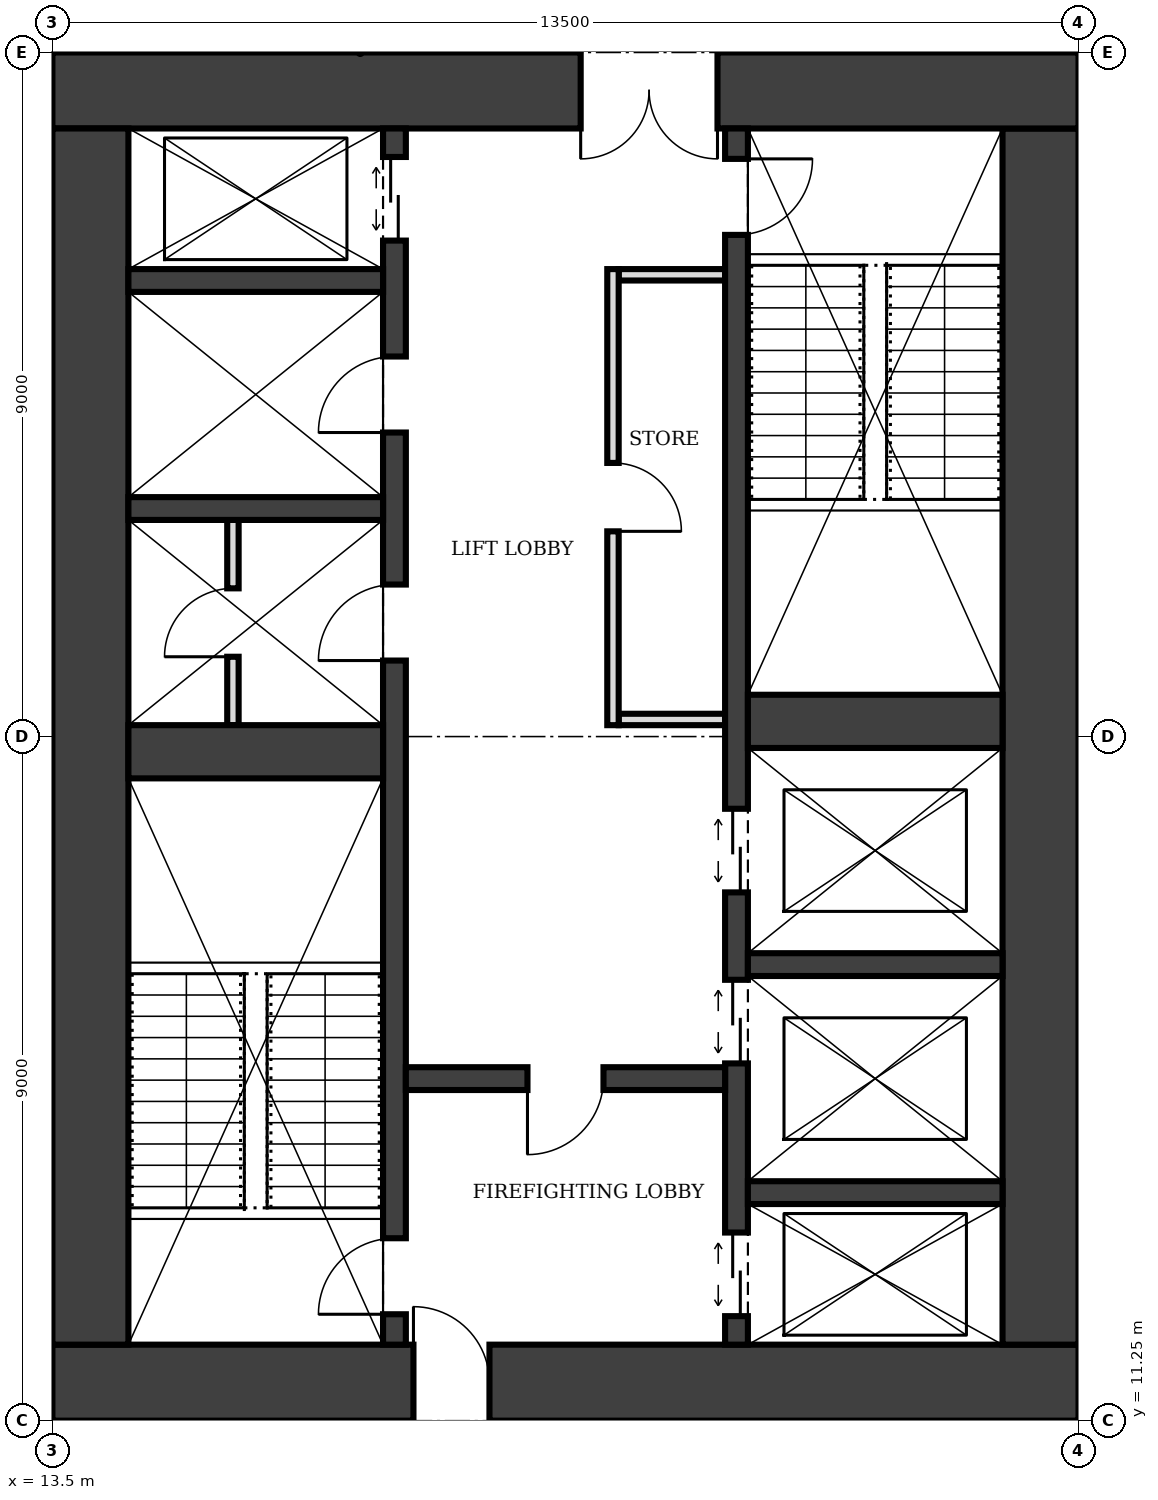
"""IFC4 building model, lengths in metres.
Left out: names, types, materials, properties, quantities, classifications, styles, units other than length and angle.
Written with IfcOpenShell. Run it as: python <this file> out.ifc"""

import sys

from ifc_helpers import new_model, si_unit, direction, frame, frame_2d, origin, place, context, subcontext, project, spatial, rectangle, extrude, element, fill, save


model = new_model("IFC4")
c1 = context("Model", 3, precision=1e-05, world=origin(), true_north=direction((0.0, 1.0)))
c2 = subcontext(c1, "Body", "Model", "MODEL_VIEW")
j1 = project(units=[si_unit("LENGTHUNIT", "METRE"), si_unit("PLANEANGLEUNIT", "RADIAN")], contexts=[c1])
p1 = place(None, origin())
s1 = spatial("IfcSite", under=j1, at=p1, CompositionType="ELEMENT")
p2 = place(p1, origin())
s2 = spatial("IfcBuilding", under=s1, at=p2, CompositionType="ELEMENT")
p3 = place(p2, frame((0.0, 0.0, 253.0)))
s3 = spatial("IfcBuildingStorey", under=s2, at=p3, CompositionType="ELEMENT", Elevation=253.0)
p4 = place(p3, frame((13.5, 11.75, 0.0), z_axis=(0.0, 0.0, 1.0), x_axis=(1.0, 0.0, 0.0)))
e1 = element("IfcWall", 1, at=p4, inside=s3, PredefinedType="SHEAR", context=c2, shape_type="SweptSolid", body=[
    extrude(rectangle(XDim=13.5, YDim=1.0, at=frame_2d((6.75, 0.0))), origin(), (0.0, 0.0, 1.0), 4.0),
])
p5 = place(p4, frame((4.75, 0.0, 0.0)))
e2 = element("IfcOpeningElement", 2, at=p5, cuts=e1, PredefinedType="OPENING", context=c2, shape_type="SweptSolid", body=[
    extrude(rectangle(XDim=1.0, YDim=2.1, at=frame_2d((0.5, 1.05))), frame((0.0, 0.51, 0.0), z_axis=(0.0, -1.0, 0.0), x_axis=(1.0, 0.0, 0.0)), (0.0, 0.0, 1.0), 1.02),
])
p6 = place(p3, frame((26.5, 12.25, 0.0), z_axis=(0.0, 0.0, 1.0), x_axis=(0.0, 1.0, 0.0)))
e3 = element("IfcWall", 3, at=p6, inside=s3, PredefinedType="SHEAR", context=c2, shape_type="SweptSolid", body=[
    extrude(rectangle(XDim=16.0, YDim=1.0, at=frame_2d((8.0, 0.0))), origin(), (0.0, 0.0, 1.0), 4.0),
])
p7 = place(p3, frame((27.0, 28.75, 0.0), z_axis=(0.0, 0.0, 1.0), x_axis=(-1.0, 0.0, 0.0)))
e4 = element("IfcWall", 4, at=p7, inside=s3, PredefinedType="SHEAR", context=c2, shape_type="SweptSolid", body=[
    extrude(rectangle(XDim=13.5, YDim=1.0, at=frame_2d((6.75, 0.0))), origin(), (0.0, 0.0, 1.0), 4.0),
])
p8 = place(p7, frame((4.75, 0.0, 0.0)))
e5 = element("IfcOpeningElement", 5, at=p8, cuts=e4, PredefinedType="OPENING", context=c2, shape_type="SweptSolid", body=[
    extrude(rectangle(XDim=1.8, YDim=2.1, at=frame_2d((0.9, 1.05))), frame((0.0, 0.51, 0.0), z_axis=(0.0, -1.0, 0.0), x_axis=(1.0, 0.0, 0.0)), (0.0, 0.0, 1.0), 1.02),
])
p9 = place(p3, frame((14.0, 28.25, 0.0), z_axis=(0.0, 0.0, 1.0), x_axis=(0.0, -1.0, 0.0)))
e6 = element("IfcWall", 6, at=p9, inside=s3, PredefinedType="SHEAR", context=c2, shape_type="SweptSolid", body=[
    extrude(rectangle(XDim=16.0, YDim=1.0, at=frame_2d((8.0, 0.0))), origin(), (0.0, 0.0, 1.0), 4.0),
])
p10 = place(p3, frame((18.0, 12.25, 0.0), z_axis=(0.0, 0.0, 1.0), x_axis=(0.0, 1.0, 0.0)))
e7 = element("IfcWall", 7, at=p10, inside=s3, PredefinedType="SHEAR", context=c2, shape_type="SweptSolid", body=[
    extrude(rectangle(XDim=16.0, YDim=0.3, at=frame_2d((8.0, 0.0))), origin(), (0.0, 0.0, 1.0), 4.0),
])
p11 = place(p10, frame((0.4, 0.0, 0.0)))
e8 = element("IfcOpeningElement", 8, at=p11, cuts=e7, PredefinedType="OPENING", context=c2, shape_type="SweptSolid", body=[
    extrude(rectangle(XDim=1.0, YDim=2.1, at=frame_2d((0.5, 1.05))), frame((0.0, 0.16, 0.0), z_axis=(0.0, -1.0, 0.0), x_axis=(1.0, 0.0, 0.0)), (0.0, 0.0, 1.0), 0.32),
])
p12 = place(p10, frame((14.525, 0.0, 0.0)))
e9 = element("IfcOpeningElement", 9, at=p12, cuts=e7, PredefinedType="OPENING", context=c2, shape_type="SweptSolid", body=[
    extrude(rectangle(XDim=1.1, YDim=2.1, at=frame_2d((0.55, 1.05))), frame((0.0, 0.16, 0.0), z_axis=(0.0, -1.0, 0.0), x_axis=(1.0, 0.0, 0.0)), (0.0, 0.0, 1.0), 0.32),
])
p13 = place(p10, frame((9.0, 0.0, 0.0)))
e10 = element("IfcOpeningElement", 10, at=p13, cuts=e7, PredefinedType="OPENING", context=c2, shape_type="SweptSolid", body=[
    extrude(rectangle(XDim=1.0, YDim=2.1, at=frame_2d((0.5, 1.05))), frame((0.0, 0.16, 0.0), z_axis=(0.0, -1.0, 0.0), x_axis=(1.0, 0.0, 0.0)), (0.0, 0.0, 1.0), 0.32),
])
p14 = place(p10, frame((12.0, 0.0, 0.0)))
e11 = element("IfcOpeningElement", 11, at=p14, cuts=e7, PredefinedType="OPENING", context=c2, shape_type="SweptSolid", body=[
    extrude(rectangle(XDim=1.0, YDim=2.1, at=frame_2d((0.5, 1.05))), frame((0.0, 0.16, 0.0), z_axis=(0.0, -1.0, 0.0), x_axis=(1.0, 0.0, 0.0)), (0.0, 0.0, 1.0), 0.32),
])
p15 = place(p3, frame((22.5, 12.25, 0.0), z_axis=(0.0, 0.0, 1.0), x_axis=(0.0, 1.0, 0.0)))
e12 = element("IfcWall", 12, at=p15, inside=s3, PredefinedType="SHEAR", context=c2, shape_type="SweptSolid", body=[
    extrude(rectangle(XDim=16.0, YDim=0.3, at=frame_2d((8.0, 0.0))), origin(), (0.0, 0.0, 1.0), 4.0),
])
p16 = place(p15, frame((14.6, 0.0, 0.0)))
e13 = element("IfcOpeningElement", 13, at=p16, cuts=e12, PredefinedType="OPENING", context=c2, shape_type="SweptSolid", body=[
    extrude(rectangle(XDim=1.0, YDim=2.1, at=frame_2d((0.5, 1.05))), frame((0.0, 0.16, 0.0), z_axis=(0.0, -1.0, 0.0), x_axis=(1.0, 0.0, 0.0)), (0.0, 0.0, 1.0), 0.32),
])
p17 = place(p15, frame((0.375, 0.0, 0.0)))
e14 = element("IfcOpeningElement", 14, at=p17, cuts=e12, PredefinedType="OPENING", context=c2, shape_type="SweptSolid", body=[
    extrude(rectangle(XDim=1.1, YDim=2.1, at=frame_2d((0.55, 1.05))), frame((0.0, 0.16, 0.0), z_axis=(0.0, -1.0, 0.0), x_axis=(1.0, 0.0, 0.0)), (0.0, 0.0, 1.0), 0.32),
])
p18 = place(p15, frame((3.7, 0.0, 0.0)))
e15 = element("IfcOpeningElement", 15, at=p18, cuts=e12, PredefinedType="OPENING", context=c2, shape_type="SweptSolid", body=[
    extrude(rectangle(XDim=1.1, YDim=2.1, at=frame_2d((0.55, 1.05))), frame((0.0, 0.16, 0.0), z_axis=(0.0, -1.0, 0.0), x_axis=(1.0, 0.0, 0.0)), (0.0, 0.0, 1.0), 0.32),
])
p19 = place(p15, frame((5.95, 0.0, 0.0)))
e16 = element("IfcOpeningElement", 16, at=p19, cuts=e12, PredefinedType="OPENING", context=c2, shape_type="SweptSolid", body=[
    extrude(rectangle(XDim=1.1, YDim=2.1, at=frame_2d((0.55, 1.05))), frame((0.0, 0.16, 0.0), z_axis=(0.0, -1.0, 0.0), x_axis=(1.0, 0.0, 0.0)), (0.0, 0.0, 1.0), 0.32),
])
p20 = place(p3, frame((14.5, 20.05, 0.0), z_axis=(0.0, 0.0, 1.0), x_axis=(1.0, 0.0, 0.0)))
e17 = element("IfcWall", 17, at=p20, inside=s3, PredefinedType="SHEAR", context=c2, shape_type="SweptSolid", body=[
    extrude(rectangle(XDim=3.35, YDim=0.7, at=frame_2d((1.675, 0.0))), origin(), (0.0, 0.0, 1.0), 4.0),
])
p21 = place(p3, frame((18.15, 15.75, 0.0), z_axis=(0.0, 0.0, 1.0), x_axis=(1.0, 0.0, 0.0)))
e18 = element("IfcWall", 18, at=p21, inside=s3, PredefinedType="SHEAR", context=c2, shape_type="SweptSolid", body=[
    extrude(rectangle(XDim=4.2, YDim=0.3, at=frame_2d((2.1, 0.0))), origin(), (0.0, 0.0, 1.0), 4.0),
])
p22 = place(p21, frame((1.6, 0.0, 0.0)))
e19 = element("IfcOpeningElement", 19, at=p22, cuts=e18, PredefinedType="OPENING", context=c2, shape_type="SweptSolid", body=[
    extrude(rectangle(XDim=1.0, YDim=2.1, at=frame_2d((0.5, 1.05))), frame((0.0, 0.16, 0.0), z_axis=(0.0, -1.0, 0.0), x_axis=(1.0, 0.0, 0.0)), (0.0, 0.0, 1.0), 0.32),
])
for number, where, z_axis, x_axis in (
    (20, (22.65, 14.25, 0.0), (0.0, 0.0, 1.0), (1.0, 0.0, 0.0)),
    (21, (22.65, 17.25, 0.0), (0.0, 0.0, 1.0), (1.0, 0.0, 0.0)),
):
    element("IfcWall", number, at=place(p3, frame(where, z_axis=z_axis, x_axis=x_axis)), inside=s3, PredefinedType="SHEAR", context=c2, shape_type="SweptSolid", body=[
        extrude(rectangle(XDim=3.35, YDim=0.3, at=frame_2d((1.675, 0.0))), origin(), (0.0, 0.0, 1.0), 4.0),
    ])
p23 = place(p3, frame((22.65, 20.45, 0.0), z_axis=(0.0, 0.0, 1.0), x_axis=(1.0, 0.0, 0.0)))
e22 = element("IfcWall", 22, at=p23, inside=s3, PredefinedType="SHEAR", context=c2, shape_type="SweptSolid", body=[
    extrude(rectangle(XDim=3.35, YDim=0.7, at=frame_2d((1.675, 0.0))), origin(), (0.0, 0.0, 1.0), 4.0),
])
for number, where, z_axis, x_axis in (
    (23, (14.5, 23.25, 0.0), (0.0, 0.0, 1.0), (1.0, 0.0, 0.0)),
    (24, (14.5, 26.25, 0.0), (0.0, 0.0, 1.0), (1.0, 0.0, 0.0)),
):
    element("IfcWall", number, at=place(p3, frame(where, z_axis=z_axis, x_axis=x_axis)), inside=s3, PredefinedType="SHEAR", context=c2, shape_type="SweptSolid", body=[
        extrude(rectangle(XDim=3.35, YDim=0.3, at=frame_2d((1.675, 0.0))), origin(), (0.0, 0.0, 1.0), 4.0),
    ])
p24 = place(p3, frame((20.875, 20.4, 0.0), z_axis=(0.0, 0.0, 1.0), x_axis=(0.0, 1.0, 0.0)))
e25 = element("IfcWall", 25, at=p24, inside=s3, PredefinedType="PARTITIONING", context=c2, shape_type="SweptSolid", body=[
    extrude(rectangle(XDim=6.0, YDim=0.15, at=frame_2d((3.0, 0.0))), origin(), (0.0, 0.0, 1.0), 3.75),
])
p25 = place(p24, frame((2.55, 0.0, 0.0)))
e26 = element("IfcOpeningElement", 26, at=p25, cuts=e25, PredefinedType="OPENING", context=c2, shape_type="SweptSolid", body=[
    extrude(rectangle(XDim=0.9, YDim=2.1, at=frame_2d((0.45, 1.05))), frame((0.0, 0.085, 0.0), z_axis=(0.0, -1.0, 0.0), x_axis=(1.0, 0.0, 0.0)), (0.0, 0.0, 1.0), 0.17),
])
for number, where, z_axis, x_axis in (
    (27, (20.95, 20.475, 0.0), (0.0, 0.0, 1.0), (1.0, 0.0, 0.0)),
    (28, (20.95, 26.325, 0.0), (0.0, 0.0, 1.0), (1.0, 0.0, 0.0)),
):
    element("IfcWall", number, at=place(p3, frame(where, z_axis=z_axis, x_axis=x_axis)), inside=s3, PredefinedType="PARTITIONING", context=c2, shape_type="SweptSolid", body=[
        extrude(rectangle(XDim=1.4, YDim=0.15, at=frame_2d((0.7, 0.0))), origin(), (0.0, 0.0, 1.0), 3.75),
    ])
p26 = place(p3, frame((15.875, 20.4, 0.0), z_axis=(0.0, 0.0, 1.0), x_axis=(0.0, 1.0, 0.0)))
e29 = element("IfcWall", 29, at=p26, inside=s3, PredefinedType="PARTITIONING", context=c2, shape_type="SweptSolid", body=[
    extrude(rectangle(XDim=2.7, YDim=0.15, at=frame_2d((1.35, 0.0))), origin(), (0.0, 0.0, 1.0), 3.75),
])
p27 = place(p26, frame((0.9, 0.0, 0.0)))
e30 = element("IfcOpeningElement", 30, at=p27, cuts=e29, PredefinedType="OPENING", context=c2, shape_type="SweptSolid", body=[
    extrude(rectangle(XDim=0.9, YDim=2.1, at=frame_2d((0.45, 1.05))), frame((0.0, 0.085, 0.0), z_axis=(0.0, -1.0, 0.0), x_axis=(1.0, 0.0, 0.0)), (0.0, 0.0, 1.0), 0.17),
])
p28 = place(p5, origin())
e31 = element("IfcDoor", 31, at=p28, inside=s3, OperationType="SINGLE_SWING_LEFT", PredefinedType="DOOR", context=c2, shape_type="SweptSolid", body=[
    extrude(rectangle(XDim=1.0, YDim=2.1, at=frame_2d((0.5, 1.05))), frame((0.0, 0.025, 0.0), z_axis=(0.0, -1.0, 0.0), x_axis=(1.0, 0.0, 0.0)), (0.0, 0.0, 1.0), 0.05),
])
fill(e2, e31)
p29 = place(p8, origin())
e32 = element("IfcDoor", 32, at=p29, inside=s3, OperationType="DOUBLE_DOOR_SINGLE_SWING", PredefinedType="DOOR", context=c2, shape_type="SweptSolid", body=[
    extrude(rectangle(XDim=1.8, YDim=2.1, at=frame_2d((0.9, 1.05))), frame((0.0, 0.025, 0.0), z_axis=(0.0, -1.0, 0.0), x_axis=(1.0, 0.0, 0.0)), (0.0, 0.0, 1.0), 0.05),
])
fill(e5, e32)
p30 = place(p22, frame((1.0, 0.0, 0.0), z_axis=(0.0, 0.0, 1.0), x_axis=(-1.0, 0.0, 0.0)))
e33 = element("IfcDoor", 33, at=p30, inside=s3, OperationType="SINGLE_SWING_RIGHT", PredefinedType="DOOR", context=c2, shape_type="SweptSolid", body=[
    extrude(rectangle(XDim=1.0, YDim=2.1, at=frame_2d((0.5, 1.05))), frame((0.0, 0.025, 0.0), z_axis=(0.0, -1.0, 0.0), x_axis=(1.0, 0.0, 0.0)), (0.0, 0.0, 1.0), 0.05),
])
fill(e19, e33)
p31 = place(p11, origin())
e34 = element("IfcDoor", 34, at=p31, inside=s3, OperationType="SINGLE_SWING_LEFT", PredefinedType="DOOR", context=c2, shape_type="SweptSolid", body=[
    extrude(rectangle(XDim=1.0, YDim=2.1, at=frame_2d((0.5, 1.05))), frame((0.0, 0.025, 0.0), z_axis=(0.0, -1.0, 0.0), x_axis=(1.0, 0.0, 0.0)), (0.0, 0.0, 1.0), 0.05),
])
fill(e8, e34)
p32 = place(p16, frame((1.0, 0.0, 0.0), z_axis=(0.0, 0.0, 1.0), x_axis=(-1.0, 0.0, 0.0)))
e35 = element("IfcDoor", 35, at=p32, inside=s3, OperationType="SINGLE_SWING_LEFT", PredefinedType="DOOR", context=c2, shape_type="SweptSolid", body=[
    extrude(rectangle(XDim=1.0, YDim=2.1, at=frame_2d((0.5, 1.05))), frame((0.0, 0.025, 0.0), z_axis=(0.0, -1.0, 0.0), x_axis=(1.0, 0.0, 0.0)), (0.0, 0.0, 1.0), 0.05),
])
fill(e13, e35)
p33 = place(p17, origin())
e36 = element("IfcDoor", 36, at=p33, inside=s3, OperationType="DOUBLE_DOOR_SLIDING", PredefinedType="DOOR", context=c2, shape_type="SweptSolid", body=[
    extrude(rectangle(XDim=1.1, YDim=2.1, at=frame_2d((0.55, 1.05))), frame((0.0, 0.025, 0.0), z_axis=(0.0, -1.0, 0.0), x_axis=(1.0, 0.0, 0.0)), (0.0, 0.0, 1.0), 0.05),
])
fill(e14, e36)
p34 = place(p12, origin())
e37 = element("IfcDoor", 37, at=p34, inside=s3, OperationType="DOUBLE_DOOR_SLIDING", PredefinedType="DOOR", context=c2, shape_type="SweptSolid", body=[
    extrude(rectangle(XDim=1.1, YDim=2.1, at=frame_2d((0.55, 1.05))), frame((0.0, 0.025, 0.0), z_axis=(0.0, -1.0, 0.0), x_axis=(1.0, 0.0, 0.0)), (0.0, 0.0, 1.0), 0.05),
])
fill(e9, e37)
p35 = place(p18, origin())
e38 = element("IfcDoor", 38, at=p35, inside=s3, OperationType="DOUBLE_DOOR_SLIDING", PredefinedType="DOOR", context=c2, shape_type="SweptSolid", body=[
    extrude(rectangle(XDim=1.1, YDim=2.1, at=frame_2d((0.55, 1.05))), frame((0.0, 0.025, 0.0), z_axis=(0.0, -1.0, 0.0), x_axis=(1.0, 0.0, 0.0)), (0.0, 0.0, 1.0), 0.05),
])
fill(e15, e38)
p36 = place(p19, origin())
e39 = element("IfcDoor", 39, at=p36, inside=s3, OperationType="DOUBLE_DOOR_SLIDING", PredefinedType="DOOR", context=c2, shape_type="SweptSolid", body=[
    extrude(rectangle(XDim=1.1, YDim=2.1, at=frame_2d((0.55, 1.05))), frame((0.0, 0.025, 0.0), z_axis=(0.0, -1.0, 0.0), x_axis=(1.0, 0.0, 0.0)), (0.0, 0.0, 1.0), 0.05),
])
fill(e16, e39)
p37 = place(p25, frame((0.9, 0.0, 0.0), z_axis=(0.0, 0.0, 1.0), x_axis=(-1.0, 0.0, 0.0)))
e40 = element("IfcDoor", 40, at=p37, inside=s3, OperationType="SINGLE_SWING_RIGHT", PredefinedType="DOOR", context=c2, shape_type="SweptSolid", body=[
    extrude(rectangle(XDim=0.9, YDim=2.1, at=frame_2d((0.45, 1.05))), frame((0.0, 0.025, 0.0), z_axis=(0.0, -1.0, 0.0), x_axis=(1.0, 0.0, 0.0)), (0.0, 0.0, 1.0), 0.05),
])
fill(e26, e40)
p38 = place(p13, origin())
e41 = element("IfcDoor", 41, at=p38, inside=s3, OperationType="SINGLE_SWING_LEFT", PredefinedType="DOOR", context=c2, shape_type="SweptSolid", body=[
    extrude(rectangle(XDim=1.0, YDim=2.1, at=frame_2d((0.5, 1.05))), frame((0.0, 0.025, 0.0), z_axis=(0.0, -1.0, 0.0), x_axis=(1.0, 0.0, 0.0)), (0.0, 0.0, 1.0), 0.05),
])
fill(e10, e41)
p39 = place(p27, origin())
e42 = element("IfcDoor", 42, at=p39, inside=s3, OperationType="SINGLE_SWING_LEFT", PredefinedType="DOOR", context=c2, shape_type="SweptSolid", body=[
    extrude(rectangle(XDim=0.9, YDim=2.1, at=frame_2d((0.45, 1.05))), frame((0.0, 0.025, 0.0), z_axis=(0.0, -1.0, 0.0), x_axis=(1.0, 0.0, 0.0)), (0.0, 0.0, 1.0), 0.05),
])
fill(e30, e42)
p40 = place(p14, origin())
e43 = element("IfcDoor", 43, at=p40, inside=s3, OperationType="SINGLE_SWING_LEFT", PredefinedType="DOOR", context=c2, shape_type="SweptSolid", body=[
    extrude(rectangle(XDim=1.0, YDim=2.1, at=frame_2d((0.5, 1.05))), frame((0.0, 0.025, 0.0), z_axis=(0.0, -1.0, 0.0), x_axis=(1.0, 0.0, 0.0)), (0.0, 0.0, 1.0), 0.05),
])
fill(e11, e43)
save(model, sys.argv[1])
